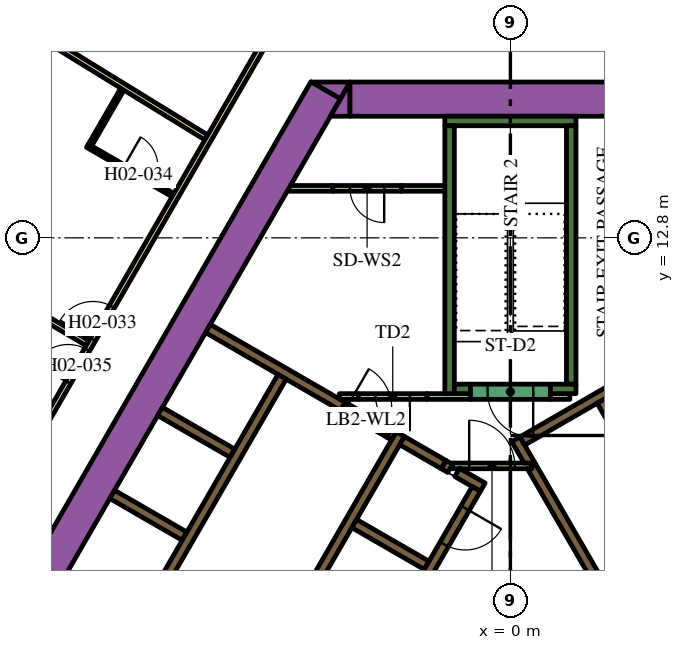
"""IFC4 building model, lengths in metres.
Left out: names, types, materials, properties, quantities, classifications, styles, units other than length and angle.
Written with IfcOpenShell. Run it as: python <this file> out.ifc"""

import sys

from ifc_helpers import new_model, si_unit, direction, frame, frame_2d, origin, place, context, subcontext, project, spatial, polyline, rectangle, outline, extrude, element, fill, save


model = new_model("IFC4")
c1 = context("Model", 3, precision=1e-05, world=origin(), true_north=direction((0.0, 1.0)))
c2 = subcontext(c1, "Body", "Model", "MODEL_VIEW")
j1 = project(units=[si_unit("LENGTHUNIT", "METRE"), si_unit("PLANEANGLEUNIT", "RADIAN")], contexts=[c1])
p1 = place(None, origin())
s1 = spatial("IfcSite", under=j1, at=p1, CompositionType="ELEMENT")
p2 = place(p1, origin())
s2 = spatial("IfcBuilding", under=s1, at=p2, CompositionType="ELEMENT")
p3 = place(p2, frame((0.0, 0.0, 39.3)))
s3 = spatial("IfcBuildingStorey", under=s2, at=p3, CompositionType="ELEMENT", Elevation=39.3)
p4 = place(p3, frame((-15.36, -1.503, 0.0), z_axis=(0.0, 0.0, 1.0), x_axis=(0.50000389221, 0.866023156604, 0.0)))
e1 = element("IfcWall", 1, at=p4, inside=s3, PredefinedType="SOLIDWALL", context=c2, shape_type="SweptSolid", body=[
    extrude(rectangle(XDim=21.0, YDim=0.9, at=frame_2d((10.5, 0.0))), origin(), (0.0, 0.0, 1.0), 3.9),
])
p5 = place(p3, origin())
e2 = element("IfcWall", 2, at=p5, inside=s3, PredefinedType="SOLIDWALL", context=c2, shape_type="SweptSolid", body=[
    extrude(outline(polyline([(-4.215, 16.9), (-4.469, 16.46), (-5.231, 16.9), (-4.215, 16.9)])), origin(), (0.0, 0.0, 1.0), 3.9),
])
p6 = place(p3, frame((-4.224, 16.45, 0.0), z_axis=(0.0, 0.0, 1.0), x_axis=(1.0, 0.0, 0.0)))
e3 = element("IfcWall", 3, at=p6, inside=s3, PredefinedType="SOLIDWALL", context=c2, shape_type="SweptSolid", body=[
    extrude(rectangle(XDim=9.488, YDim=0.9, at=frame_2d((4.744, 0.0))), origin(), (0.0, 0.0, 1.0), 3.9),
])
e4 = element("IfcWall", 4, at=p5, inside=s3, PredefinedType="SOLIDWALL", context=c2, shape_type="SweptSolid", body=[
    extrude(outline(polyline([(-4.734, 16.0), (-4.226, 16.88), (-4.226, 16.0), (-4.734, 16.0)])), origin(), (0.0, 0.0, 1.0), 3.9),
])
p7 = place(p3, frame((-1.725, 15.875, 0.0), z_axis=(0.0, 0.0, 1.0), x_axis=(1.0, 0.0, 0.0)))
e5 = element("IfcWall", 5, at=p7, inside=s3, PredefinedType="SOLIDWALL", context=c2, shape_type="SweptSolid", body=[
    extrude(rectangle(XDim=3.45, YDim=0.25, at=frame_2d((1.725, 0.0))), origin(), (0.0, 0.0, 1.0), 3.9),
])
p8 = place(p3, frame((1.6, 8.95, 0.0), z_axis=(0.0, 0.0, 1.0), x_axis=(0.0, 1.0, 0.0)))
e6 = element("IfcWall", 6, at=p8, inside=s3, PredefinedType="SOLIDWALL", context=c2, shape_type="SweptSolid", body=[
    extrude(rectangle(XDim=6.8, YDim=0.25, at=frame_2d((3.4, 0.0))), origin(), (0.0, 0.0, 1.0), 3.9),
])
p9 = place(p3, frame((1.05, 8.825, 0.0), z_axis=(0.0, 0.0, 1.0), x_axis=(1.0, 0.0, 0.0)))
e7 = element("IfcWall", 7, at=p9, inside=s3, PredefinedType="SOLIDWALL", context=c2, shape_type="SweptSolid", body=[
    extrude(rectangle(XDim=0.675, YDim=0.25, at=frame_2d((0.337, 0.0))), origin(), (0.0, 0.0, 1.0), 3.9),
])
p10 = place(p3, frame((-1.6, 8.7, 0.0), z_axis=(0.0, 0.0, 1.0), x_axis=(0.0, 1.0, 0.0)))
e8 = element("IfcWall", 8, at=p10, inside=s3, PredefinedType="SOLIDWALL", context=c2, shape_type="SweptSolid", body=[
    extrude(rectangle(XDim=7.05, YDim=0.25, at=frame_2d((3.525, 0.0))), origin(), (0.0, 0.0, 1.0), 3.9),
])
p11 = place(p3, frame((-1.475, 8.825, 0.0), z_axis=(0.0, 0.0, 1.0), x_axis=(1.0, 0.0, 0.0)))
e9 = element("IfcWall", 9, at=p11, inside=s3, PredefinedType="SOLIDWALL", context=c2, shape_type="SweptSolid", body=[
    extrude(rectangle(XDim=0.425, YDim=0.25, at=frame_2d((0.212, 0.0))), origin(), (0.0, 0.0, 1.0), 3.9),
])
e10 = element("IfcWall", 10, at=p5, inside=s3, PredefinedType="SOLIDWALL", context=c2, shape_type="SweptSolid", body=[
    extrude(outline(polyline([(0.566, 6.725), (0.566, 6.875), (0.566, 6.875), (0.565, 6.875), (0.361, 6.875), (0.035, 7.439), (0.252, 7.564), (0.377, 7.348), (6.552, -3.348), (6.677, -3.564), (6.46, -3.689), (0.448, 6.725), (0.565, 6.725), (0.566, 6.725), (0.566, 6.725)])), origin(), (0.0, 0.0, 1.0), 3.9),
])
p12 = place(p3, frame((0.314, 7.456, 0.0), z_axis=(0.0, 0.0, 1.0), x_axis=(0.866013897511, 0.50001992892, 0.0)))
e11 = element("IfcWall", 11, at=p12, inside=s3, PredefinedType="SOLIDWALL", context=c2, shape_type="SweptSolid", body=[
    extrude(rectangle(XDim=3.268, YDim=0.25, at=frame_2d((1.634, 0.0))), origin(), (0.0, 0.0, 1.0), 3.9),
])
p13 = place(p3, frame((-8.06, -1.311, 0.0), z_axis=(0.0, 0.0, 1.0), x_axis=(0.50000273126, 0.866023826885, 0.0)))
e12 = element("IfcWall", 12, at=p13, inside=s3, PredefinedType="SOLIDWALL", context=c2, shape_type="SweptSolid", body=[
    extrude(rectangle(XDim=10.33, YDim=0.25, at=frame_2d((5.165, 0.0))), origin(), (0.0, 0.0, 1.0), 3.9),
])
p14 = place(p3, frame((-1.758, 6.835, 0.0), z_axis=(0.0, 0.0, 1.0), x_axis=(0.865982457891, -0.500074377092, 0.0)))
e13 = element("IfcWall", 13, at=p14, inside=s3, PredefinedType="SOLIDWALL", context=c2, shape_type="SweptSolid", body=[
    extrude(rectangle(XDim=0.2, YDim=0.25, at=frame_2d((0.1, 0.0))), origin(), (0.0, 0.0, 1.0), 3.9),
])
p15 = place(p3, frame((-1.76, 6.836, 0.0), z_axis=(0.0, 0.0, 1.0), x_axis=(-0.865952863304, 0.500125622755, 0.0)))
e14 = element("IfcWall", 14, at=p15, inside=s3, PredefinedType="SOLIDWALL", context=c2, shape_type="SweptSolid", body=[
    extrude(rectangle(XDim=1.258, YDim=0.25, at=frame_2d((0.629, 0.0))), origin(), (0.0, 0.0, 1.0), 3.9),
])
p16 = place(p3, frame((-0.728, 6.24, 0.0), z_axis=(0.0, 0.0, 1.0), x_axis=(-0.865955664968, 0.500120771724, 0.0)))
e15 = element("IfcWall", 15, at=p16, inside=s3, PredefinedType="SOLIDWALL", context=c2, shape_type="SweptSolid", body=[
    extrude(rectangle(XDim=0.778, YDim=0.25, at=frame_2d((0.389, 0.0))), origin(), (0.0, 0.0, 1.0), 3.9),
])
p17 = place(p3, frame((-2.204, 4.182, 0.0), z_axis=(0.0, 0.0, 1.0), x_axis=(-0.866008176907, 0.50002983664, 0.0)))
e16 = element("IfcWall", 16, at=p17, inside=s3, PredefinedType="SOLIDWALL", context=c2, shape_type="SweptSolid", body=[
    extrude(rectangle(XDim=2.2, YDim=0.25, at=frame_2d((1.1, 0.0))), origin(), (0.0, 0.0, 1.0), 3.9),
])
e17 = element("IfcWall", 17, at=p5, inside=s3, PredefinedType="SOLIDWALL", context=c2, shape_type="SweptSolid", body=[
    extrude(outline(polyline([(-3.128, 7.481), (-3.259, 7.557), (-3.134, 7.773), (-3.003, 7.698), (-3.128, 7.481)])), origin(), (0.0, 0.0, 1.0), 3.9),
])
for number, where, z_axis, x_axis in (
    (18, (-8.574, 4.95, 0.0), (0.0, 0.0, 1.0), (-0.866, 0.5, 0.0)),
    (19, (-7.314, 7.132, 0.0), (0.0, 0.0, 1.0), (-0.866, 0.5, 0.0)),
):
    element("IfcWall", number, at=place(p3, frame(where, z_axis=z_axis, x_axis=x_axis)), inside=s3, PredefinedType="SOLIDWALL", context=c2, shape_type="SweptSolid", body=[
        extrude(rectangle(XDim=2.2, YDim=0.25, at=frame_2d((1.1, 0.0))), origin(), (0.0, 0.0, 1.0), 3.9),
    ])
p18 = place(p3, frame((-7.959, 10.415, 0.0), z_axis=(0.0, 0.0, 1.0), x_axis=(0.866020958405, -0.500007699544, 0.0)))
e20 = element("IfcWall", 20, at=p18, inside=s3, PredefinedType="SOLIDWALL", context=c2, shape_type="SweptSolid", body=[
    extrude(rectangle(XDim=4.1, YDim=0.25, at=frame_2d((2.05, 0.0))), origin(), (0.0, 0.0, 1.0), 3.9),
])
p19 = place(p3, frame((-3.997, 8.625, 0.0), z_axis=(0.0, 0.0, 1.0), x_axis=(-1.0, 0.0, 0.0)))
e21 = element("IfcWall", 21, at=p19, inside=s3, PredefinedType="PARTITIONING", context=c2, shape_type="SweptSolid", body=[
    extrude(rectangle(XDim=0.502, YDim=0.15, at=frame_2d((0.251, 0.0))), origin(), (0.0, 0.0, 1.0), 2.75),
])
p20 = place(p3, frame((-2.196, 8.625, 0.0), z_axis=(0.0, 0.0, 1.0), x_axis=(1.0, 0.0, 0.0)))
e22 = element("IfcWall", 22, at=p20, inside=s3, PredefinedType="PARTITIONING", context=c2, shape_type="SweptSolid", body=[
    extrude(rectangle(XDim=1.146, YDim=0.15, at=frame_2d((0.573, 0.0))), origin(), (0.0, 0.0, 1.0), 2.75),
])
p21 = place(p3, frame((-5.851, 14.102, 0.0), z_axis=(0.0, 0.0, 1.0), x_axis=(1.0, 0.0, 0.0)))
e23 = element("IfcWall", 23, at=p21, inside=s3, PredefinedType="PARTITIONING", context=c2, shape_type="SweptSolid", body=[
    extrude(rectangle(XDim=1.18, YDim=0.15, at=frame_2d((0.59, 0.0))), origin(), (0.0, 0.0, 1.0), 2.75),
])
p22 = place(p3, frame((-2.871, 14.102, 0.0), z_axis=(0.0, 0.0, 1.0), x_axis=(1.0, 0.0, 0.0)))
e24 = element("IfcWall", 24, at=p22, inside=s3, PredefinedType="PARTITIONING", context=c2, shape_type="SweptSolid", body=[
    extrude(rectangle(XDim=1.196, YDim=0.15, at=frame_2d((0.598, 0.0))), origin(), (0.0, 0.0, 1.0), 2.75),
])
p23 = place(p3, frame((1.05, 8.625, 0.0), z_axis=(0.0, 0.0, 1.0), x_axis=(1.0, 0.0, 0.0)))
e25 = element("IfcWall", 25, at=p23, inside=s3, PredefinedType="PARTITIONING", context=c2, shape_type="SweptSolid", body=[
    extrude(rectangle(XDim=0.514, YDim=0.15, at=frame_2d((0.257, 0.0))), origin(), (0.0, 0.0, 1.0), 2.75),
])
p24 = place(p3, frame((8.565, -2.185, 0.0), z_axis=(0.0, 0.0, 1.0), x_axis=(-0.499997954832, 0.866026584559, 0.0)))
e26 = element("IfcWall", 26, at=p24, inside=s3, PredefinedType="SOLIDWALL", context=c2, shape_type="SweptSolid", body=[
    extrude(rectangle(XDim=12.35, YDim=0.25, at=frame_2d((6.175, 0.0))), origin(), (0.0, 0.0, 1.0), 3.9),
])
p25 = place(p24, frame((5.725, 0.0, 0.0)))
e27 = element("IfcOpeningElement", 27, at=p25, cuts=e26, PredefinedType="OPENING", context=c2, shape_type="SweptSolid", body=[
    extrude(rectangle(XDim=0.9, YDim=2.1, at=frame_2d((0.45, 1.05))), frame((0.0, 0.135, 0.0), z_axis=(0.0, -1.0, 0.0), x_axis=(1.0, 0.0, 0.0)), (0.0, 0.0, 1.0), 0.27),
])
p26 = place(p3, frame((-6.008, 9.144, 0.0), z_axis=(0.0, 0.0, 1.0), x_axis=(-0.500006956611, -0.866021387346, 0.0)))
e28 = element("IfcWall", 28, at=p26, inside=s3, PredefinedType="SOLIDWALL", context=c2, shape_type="SweptSolid", body=[
    extrude(rectangle(XDim=9.83, YDim=0.25, at=frame_2d((4.915, 0.0))), origin(), (0.0, 0.0, 1.0), 3.9),
])
p27 = place(p26, frame((6.985, 0.0, 0.0)))
e29 = element("IfcOpeningElement", 29, at=p27, cuts=e28, PredefinedType="OPENING", context=c2, shape_type="SweptSolid", body=[
    extrude(rectangle(XDim=0.9, YDim=2.1, at=frame_2d((0.45, 1.05))), frame((0.0, 0.135, 0.0), z_axis=(0.0, -1.0, 0.0), x_axis=(1.0, 0.0, 0.0)), (0.0, 0.0, 1.0), 0.27),
])
p28 = place(p3, frame((-0.898, 6.194, 0.0), z_axis=(0.0, 0.0, 1.0), x_axis=(-0.499996202215, -0.866027596426, 0.0)))
e30 = element("IfcWall", 30, at=p28, inside=s3, PredefinedType="SOLIDWALL", context=c2, shape_type="SweptSolid", body=[
    extrude(rectangle(XDim=9.83, YDim=0.25, at=frame_2d((4.915, 0.0))), origin(), (0.0, 0.0, 1.0), 3.9),
])
p29 = place(p28, frame((0.585, 0.0, 0.0)))
e31 = element("IfcOpeningElement", 31, at=p29, cuts=e30, PredefinedType="OPENING", context=c2, shape_type="SweptSolid", body=[
    extrude(rectangle(XDim=1.1, YDim=2.1, at=frame_2d((0.55, 1.05))), frame((0.0, 0.135, 0.0), z_axis=(0.0, -1.0, 0.0), x_axis=(1.0, 0.0, 0.0)), (0.0, 0.0, 1.0), 0.27),
])
p30 = place(p28, frame((3.105, 0.0, 0.0)))
e32 = element("IfcOpeningElement", 32, at=p30, cuts=e30, PredefinedType="OPENING", context=c2, shape_type="SweptSolid", body=[
    extrude(rectangle(XDim=1.1, YDim=2.1, at=frame_2d((0.55, 1.05))), frame((0.0, 0.135, 0.0), z_axis=(0.0, -1.0, 0.0), x_axis=(1.0, 0.0, 0.0)), (0.0, 0.0, 1.0), 0.27),
])
p31 = place(p28, frame((5.625, 0.0, 0.0)))
e33 = element("IfcOpeningElement", 33, at=p31, cuts=e30, PredefinedType="OPENING", context=c2, shape_type="SweptSolid", body=[
    extrude(rectangle(XDim=1.1, YDim=2.1, at=frame_2d((0.55, 1.05))), frame((0.0, 0.135, 0.0), z_axis=(0.0, -1.0, 0.0), x_axis=(1.0, 0.0, 0.0)), (0.0, 0.0, 1.0), 0.27),
])
p32 = place(p28, frame((8.145, 0.0, 0.0)))
e34 = element("IfcOpeningElement", 34, at=p32, cuts=e30, PredefinedType="OPENING", context=c2, shape_type="SweptSolid", body=[
    extrude(rectangle(XDim=1.1, YDim=2.1, at=frame_2d((0.55, 1.05))), frame((0.0, 0.135, 0.0), z_axis=(0.0, -1.0, 0.0), x_axis=(1.0, 0.0, 0.0)), (0.0, 0.0, 1.0), 0.27),
])
p33 = place(p3, frame((1.05, 8.75, 0.0), z_axis=(0.0, 0.0, 1.0), x_axis=(-1.0, 0.0, 0.0)))
e35 = element("IfcWall", 35, at=p33, inside=s3, PredefinedType="SOLIDWALL", context=c2, shape_type="SweptSolid", body=[
    extrude(rectangle(XDim=2.1, YDim=0.4, at=frame_2d((1.05, 0.0))), origin(), (0.0, 0.0, 1.0), 3.9),
])
p34 = place(p33, frame((0.45, 0.0, 0.0)))
e36 = element("IfcOpeningElement", 36, at=p34, cuts=e35, PredefinedType="OPENING", context=c2, shape_type="SweptSolid", body=[
    extrude(rectangle(XDim=1.2, YDim=2.1, at=frame_2d((0.6, 1.05))), frame((0.0, 0.21, 0.0), z_axis=(0.0, -1.0, 0.0), x_axis=(1.0, 0.0, 0.0)), (0.0, 0.0, 1.0), 0.42),
])
p35 = place(p3, frame((-2.196, 8.625, 0.0), z_axis=(0.0, 0.0, 1.0), x_axis=(-1.0, 0.0, 0.0)))
e37 = element("IfcWall", 37, at=p35, inside=s3, PredefinedType="PARTITIONING", context=c2, shape_type="SweptSolid", body=[
    extrude(rectangle(XDim=1.8, YDim=0.15, at=frame_2d((0.9, 0.0))), origin(), (0.0, 0.0, 1.0), 2.75),
])
p36 = place(p35, frame((0.45, 0.0, 0.0)))
e38 = element("IfcOpeningElement", 38, at=p36, cuts=e37, PredefinedType="OPENING", context=c2, shape_type="SweptSolid", body=[
    extrude(rectangle(XDim=0.9, YDim=2.1, at=frame_2d((0.45, 1.05))), frame((0.0, 0.085, 0.0), z_axis=(0.0, -1.0, 0.0), x_axis=(1.0, 0.0, 0.0)), (0.0, 0.0, 1.0), 0.17),
])
p37 = place(p3, frame((-1.534, 6.8, 0.0), z_axis=(0.0, 0.0, 1.0), x_axis=(1.0, 0.0, 0.0)))
e39 = element("IfcWall", 39, at=p37, inside=s3, PredefinedType="PARTITIONING", context=c2, shape_type="SweptSolid", body=[
    extrude(rectangle(XDim=2.1, YDim=0.15, at=frame_2d((1.05, 0.0))), origin(), (0.0, 0.0, 1.0), 2.75),
])
p38 = place(p37, frame((0.45, 0.0, 0.0)))
e40 = element("IfcOpeningElement", 40, at=p38, cuts=e39, PredefinedType="OPENING", context=c2, shape_type="SweptSolid", body=[
    extrude(rectangle(XDim=1.2, YDim=2.1, at=frame_2d((0.6, 1.05))), frame((0.0, 0.085, 0.0), z_axis=(0.0, -1.0, 0.0), x_axis=(1.0, 0.0, 0.0)), (0.0, 0.0, 1.0), 0.17),
])
p39 = place(p3, frame((-4.409, 8.365, 0.0), z_axis=(0.0, 0.0, 1.0), x_axis=(0.866034573852, -0.49998411664, 0.0)))
e41 = element("IfcWall", 41, at=p39, inside=s3, PredefinedType="SOLIDWALL", context=c2, shape_type="SweptSolid", body=[
    extrude(rectangle(XDim=1.4, YDim=0.25, at=frame_2d((0.7, 0.0))), origin(), (0.0, 0.0, 1.0), 3.9),
])
p40 = place(p39, frame((0.1, 0.0, 0.0)))
e42 = element("IfcOpeningElement", 42, at=p40, cuts=e41, PredefinedType="OPENING", context=c2, shape_type="SweptSolid", body=[
    extrude(rectangle(XDim=1.2, YDim=2.1, at=frame_2d((0.6, 1.05))), frame((0.0, 0.135, 0.0), z_axis=(0.0, -1.0, 0.0), x_axis=(1.0, 0.0, 0.0)), (0.0, 0.0, 1.0), 0.27),
])
p41 = place(p3, frame((-2.871, 14.102, 0.0), z_axis=(0.0, 0.0, 1.0), x_axis=(-1.0, 0.0, 0.0)))
e43 = element("IfcWall", 43, at=p41, inside=s3, PredefinedType="PARTITIONING", context=c2, shape_type="SweptSolid", body=[
    extrude(rectangle(XDim=1.8, YDim=0.15, at=frame_2d((0.9, 0.0))), origin(), (0.0, 0.0, 1.0), 2.75),
])
p42 = place(p41, frame((0.45, 0.0, 0.0)))
e44 = element("IfcOpeningElement", 44, at=p42, cuts=e43, PredefinedType="OPENING", context=c2, shape_type="SweptSolid", body=[
    extrude(rectangle(XDim=0.9, YDim=2.1, at=frame_2d((0.45, 1.05))), frame((0.0, 0.085, 0.0), z_axis=(0.0, -1.0, 0.0), x_axis=(1.0, 0.0, 0.0)), (0.0, 0.0, 1.0), 0.17),
])
p43 = place(p3, frame((-19.081, -3.9, 0.0), z_axis=(0.0, 0.0, 1.0), x_axis=(0.499998313975, 0.866026377209, 0.0)))
e45 = element("IfcWall", 45, at=p43, inside=s3, PredefinedType="PARTITIONING", context=c2, shape_type="SweptSolid", body=[
    extrude(rectangle(XDim=25.766, YDim=0.15, at=frame_2d((12.883, 0.0))), origin(), (0.0, 0.0, 1.0), 2.75),
])
p44 = place(p43, frame((16.196, 0.0, 0.0)))
e46 = element("IfcOpeningElement", 46, at=p44, cuts=e45, PredefinedType="OPENING", context=c2, shape_type="SweptSolid", body=[
    extrude(rectangle(XDim=1.0, YDim=2.1, at=frame_2d((0.5, 1.05))), frame((0.0, 0.085, 0.0), z_axis=(0.0, -1.0, 0.0), x_axis=(1.0, 0.0, 0.0)), (0.0, 0.0, 1.0), 0.17),
])
p45 = place(p43, frame((14.889, 0.0, 0.0)))
e47 = element("IfcOpeningElement", 47, at=p45, cuts=e45, PredefinedType="OPENING", context=c2, shape_type="SweptSolid", body=[
    extrude(rectangle(XDim=1.0, YDim=2.1, at=frame_2d((0.5, 1.05))), frame((0.0, 0.085, 0.0), z_axis=(0.0, -1.0, 0.0), x_axis=(1.0, 0.0, 0.0)), (0.0, 0.0, 1.0), 0.17),
])
p46 = place(p43, frame((3.698, 0.0, 0.0)))
e48 = element("IfcOpeningElement", 48, at=p46, cuts=e45, PredefinedType="OPENING", context=c2, shape_type="SweptSolid", body=[
    extrude(rectangle(XDim=1.1, YDim=2.1, at=frame_2d((0.55, 1.05))), frame((0.0, 0.085, 0.0), z_axis=(0.0, -1.0, 0.0), x_axis=(1.0, 0.0, 0.0)), (0.0, 0.0, 1.0), 0.17),
])
p47 = place(p43, frame((2.392, 0.0, 0.0)))
e49 = element("IfcOpeningElement", 49, at=p47, cuts=e45, PredefinedType="OPENING", context=c2, shape_type="SweptSolid", body=[
    extrude(rectangle(XDim=1.0, YDim=2.1, at=frame_2d((0.5, 1.05))), frame((0.0, 0.085, 0.0), z_axis=(0.0, -1.0, 0.0), x_axis=(1.0, 0.0, 0.0)), (0.0, 0.0, 1.0), 0.17),
])
p48 = place(p3, frame((-17.856, 13.999, 0.0), z_axis=(0.0, 0.0, 1.0), x_axis=(0.861371519381, -0.507975497047, 0.0)))
e50 = element("IfcWall", 50, at=p48, inside=s3, PredefinedType="PARTITIONING", context=c2, shape_type="SweptSolid", body=[
    extrude(rectangle(XDim=7.804, YDim=0.15, at=frame_2d((3.902, 0.0))), origin(), (0.0, 0.0, 1.0), 2.75),
])
p49 = place(p3, frame((-14.558, 19.475, 0.0), z_axis=(0.0, 0.0, 1.0), x_axis=(0.851829455142, -0.523819223925, 0.0)))
e51 = element("IfcWall", 51, at=p49, inside=s3, PredefinedType="PARTITIONING", context=c2, shape_type="SweptSolid", body=[
    extrude(rectangle(XDim=7.688, YDim=0.15, at=frame_2d((3.844, 0.0))), origin(), (0.0, 0.0, 1.0), 2.75),
])
p50 = place(p3, frame((-11.129, 15.224, 0.0), z_axis=(0.0, 0.0, 1.0), x_axis=(0.866021400173, -0.500006934395, 0.0)))
e52 = element("IfcWall", 52, at=p50, inside=s3, PredefinedType="PARTITIONING", context=c2, shape_type="SweptSolid", body=[
    extrude(rectangle(XDim=2.6, YDim=0.1, at=frame_2d((1.3, 0.0))), origin(), (0.0, 0.0, 1.0), 2.75),
])
p51 = place(p50, frame((1.1, 0.0, 0.0)))
e53 = element("IfcOpeningElement", 53, at=p51, cuts=e52, PredefinedType="OPENING", context=c2, shape_type="SweptSolid", body=[
    extrude(rectangle(XDim=0.9, YDim=2.1, at=frame_2d((0.45, 1.05))), frame((0.0, 0.06, 0.0), z_axis=(0.0, -1.0, 0.0), x_axis=(1.0, 0.0, 0.0)), (0.0, 0.0, 1.0), 0.12),
])
p52 = place(p3, frame((-11.061, 15.242, 0.0), z_axis=(0.0, 0.0, 1.0), x_axis=(0.499976720371, 0.866038843867, 0.0)))
e54 = element("IfcWall", 54, at=p52, inside=s3, PredefinedType="PARTITIONING", context=c2, shape_type="SweptSolid", body=[
    extrude(rectangle(XDim=1.69, YDim=0.1, at=frame_2d((0.845, 0.0))), origin(), (0.0, 0.0, 1.0), 2.75),
])
p53 = place(p29, origin())
e55 = element("IfcDoor", 55, at=p53, inside=s3, OperationType="DOUBLE_DOOR_SLIDING", PredefinedType="DOOR", context=c2, shape_type="SweptSolid", body=[
    extrude(rectangle(XDim=1.1, YDim=2.1, at=frame_2d((0.55, 1.05))), frame((0.0, 0.025, 0.0), z_axis=(0.0, -1.0, 0.0), x_axis=(1.0, 0.0, 0.0)), (0.0, 0.0, 1.0), 0.05),
])
fill(e31, e55)
p54 = place(p34, origin())
e56 = element("IfcDoor", 56, at=p54, inside=s3, OperationType="SINGLE_SWING_LEFT", PredefinedType="DOOR", context=c2, shape_type="SweptSolid", body=[
    extrude(rectangle(XDim=1.2, YDim=2.1, at=frame_2d((0.6, 1.05))), frame((0.0, 0.025, 0.0), z_axis=(0.0, -1.0, 0.0), x_axis=(1.0, 0.0, 0.0)), (0.0, 0.0, 1.0), 0.05),
])
fill(e36, e56)
p55 = place(p36, origin())
e57 = element("IfcDoor", 57, at=p55, inside=s3, OperationType="SINGLE_SWING_LEFT", PredefinedType="DOOR", context=c2, shape_type="SweptSolid", body=[
    extrude(rectangle(XDim=0.9, YDim=2.1, at=frame_2d((0.45, 1.05))), frame((0.0, 0.025, 0.0), z_axis=(0.0, -1.0, 0.0), x_axis=(1.0, 0.0, 0.0)), (0.0, 0.0, 1.0), 0.05),
])
fill(e38, e57)
p56 = place(p38, origin())
e58 = element("IfcDoor", 58, at=p56, inside=s3, OperationType="SINGLE_SWING_LEFT", PredefinedType="DOOR", context=c2, shape_type="SweptSolid", body=[
    extrude(rectangle(XDim=1.2, YDim=2.1, at=frame_2d((0.6, 1.05))), frame((0.0, 0.025, 0.0), z_axis=(0.0, -1.0, 0.0), x_axis=(1.0, 0.0, 0.0)), (0.0, 0.0, 1.0), 0.05),
])
fill(e40, e58)
p57 = place(p40, origin())
e59 = element("IfcDoor", 59, at=p57, inside=s3, OperationType="SINGLE_SWING_LEFT", PredefinedType="DOOR", context=c2, shape_type="SweptSolid", body=[
    extrude(rectangle(XDim=1.2, YDim=2.1, at=frame_2d((0.6, 1.05))), frame((0.0, 0.025, 0.0), z_axis=(0.0, -1.0, 0.0), x_axis=(1.0, 0.0, 0.0)), (0.0, 0.0, 1.0), 0.05),
])
fill(e42, e59)
p58 = place(p42, origin())
e60 = element("IfcDoor", 60, at=p58, inside=s3, OperationType="SINGLE_SWING_LEFT", PredefinedType="DOOR", context=c2, shape_type="SweptSolid", body=[
    extrude(rectangle(XDim=0.9, YDim=2.1, at=frame_2d((0.45, 1.05))), frame((0.0, 0.025, 0.0), z_axis=(0.0, -1.0, 0.0), x_axis=(1.0, 0.0, 0.0)), (0.0, 0.0, 1.0), 0.05),
])
fill(e44, e60)
p59 = place(p44, origin())
e61 = element("IfcDoor", 61, at=p59, inside=s3, OperationType="SINGLE_SWING_LEFT", PredefinedType="DOOR", context=c2, shape_type="SweptSolid", body=[
    extrude(rectangle(XDim=1.0, YDim=2.1, at=frame_2d((0.5, 1.05))), frame((0.0, 0.025, 0.0), z_axis=(0.0, -1.0, 0.0), x_axis=(1.0, 0.0, 0.0)), (0.0, 0.0, 1.0), 0.05),
])
fill(e46, e61)
p60 = place(p51, origin())
e62 = element("IfcDoor", 62, at=p60, inside=s3, OperationType="SINGLE_SWING_RIGHT", PredefinedType="DOOR", context=c2, shape_type="SweptSolid", body=[
    extrude(rectangle(XDim=0.9, YDim=2.1, at=frame_2d((0.45, 1.05))), frame((0.0, 0.025, 0.0), z_axis=(0.0, -1.0, 0.0), x_axis=(1.0, 0.0, 0.0)), (0.0, 0.0, 1.0), 0.05),
])
fill(e53, e62)
p61 = place(p45, origin())
e63 = element("IfcDoor", 63, at=p61, inside=s3, OperationType="SINGLE_SWING_RIGHT", PredefinedType="DOOR", context=c2, shape_type="SweptSolid", body=[
    extrude(rectangle(XDim=1.0, YDim=2.1, at=frame_2d((0.5, 1.05))), frame((0.0, 0.025, 0.0), z_axis=(0.0, -1.0, 0.0), x_axis=(1.0, 0.0, 0.0)), (0.0, 0.0, 1.0), 0.05),
])
fill(e47, e63)
save(model, sys.argv[1])
